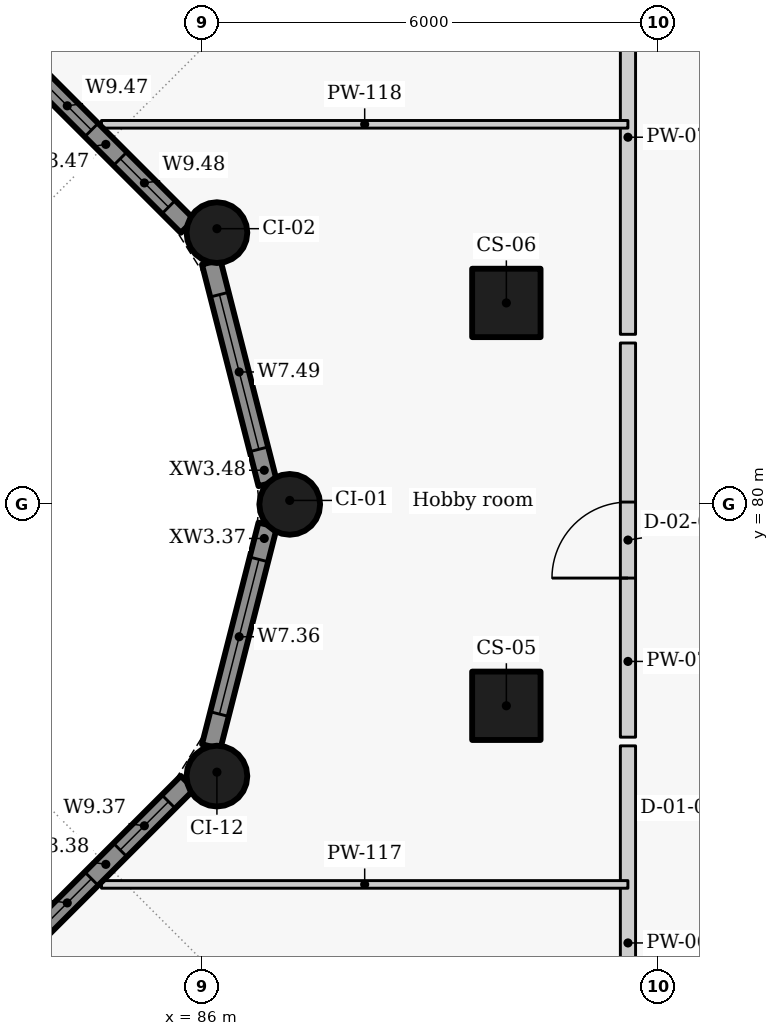
"""IFC4 building model, lengths in metres.
Left out: names, types, materials, properties, quantities, classifications, styles, units other than length and angle.
Written with IfcOpenShell. Run it as: python <this file> out.ifc"""

import sys

from ifc_helpers import new_model, si_unit, direction, frame, frame_2d, origin, origin_2d, place, context, subcontext, project, spatial, rectangle, circle, extrude, element, fill, save


model = new_model("IFC4")
c1 = context("Model", 3, precision=1e-05, world=origin(), true_north=direction((0.0, 1.0)))
c2 = subcontext(c1, "Body", "Model", "MODEL_VIEW")
j1 = project(units=[si_unit("LENGTHUNIT", "METRE"), si_unit("PLANEANGLEUNIT", "RADIAN")], contexts=[c1])
p1 = place(None, origin())
s1 = spatial("IfcSite", under=j1, at=p1, CompositionType="ELEMENT")
p2 = place(p1, origin())
s2 = spatial("IfcBuilding", under=s1, at=p2, CompositionType="ELEMENT")
p3 = place(p2, frame((0.0, 0.0, 183.3)))
s3 = spatial("IfcBuildingStorey", under=s2, at=p3, CompositionType="ELEMENT", Elevation=183.3)
for number, where, z_axis, x_axis in (
    (1, (90.0, 77.35, 0.0), (0.0, 0.0, 1.0), (0.0, 1.0, 0.0)),
    (2, (90.0, 82.65, 0.0), (0.0, 0.0, 1.0), (0.0, 1.0, 0.0)),
):
    element("IfcColumn", number, at=place(p3, frame(where, z_axis=z_axis, x_axis=x_axis)), inside=s3, PredefinedType="COLUMN", context=c2, shape_type="SweptSolid", body=[
        extrude(rectangle(XDim=0.9, YDim=0.9, at=origin_2d()), origin(), (0.0, 0.0, 1.0), 3.3),
    ])
for number, where, z_axis, x_axis in (
    (3, (87.15, 80.0, 0.0), (0.0, 0.0, 1.0), (0.0, 1.0, 0.0)),
    (4, (86.192, 83.575, 0.0), (0.0, 0.0, 1.0), (-0.5, 0.866, 0.0)),
    (5, (86.192, 76.425, 0.0), (0.0, 0.0, 1.0), (0.5, 0.866, 0.0)),
):
    element("IfcColumn", number, at=place(p3, frame(where, z_axis=z_axis, x_axis=x_axis)), inside=s3, PredefinedType="COLUMN", context=c2, shape_type="SweptSolid", body=[
        extrude(circle(Radius=0.4, at=origin_2d()), origin(), (0.0, 0.0, 1.0), 3.3),
    ])
p4 = place(p3, frame((86.86, 79.73, 0.0), z_axis=(0.0, 0.0, 1.0), x_axis=(-0.247055971283, -0.969001211069, 0.0)))
e6 = element("IfcWall", 6, at=p4, inside=s3, PredefinedType="SOLIDWALL", context=c2, shape_type="SweptSolid", body=[
    extrude(rectangle(XDim=3.01, YDim=0.25, at=frame_2d((1.505, 0.0))), origin(), (0.0, 0.0, 1.0), 2.425),
])
p5 = place(p4, frame((0.469, 0.0, 0.9)))
e7 = element("IfcOpeningElement", 7, at=p5, cuts=e6, PredefinedType="OPENING", context=c2, shape_type="SweptSolid", body=[
    extrude(rectangle(XDim=2.1, YDim=1.1, at=frame_2d((1.05, 0.55))), frame((0.0, 0.135, 0.0), z_axis=(0.0, -1.0, 0.0), x_axis=(1.0, 0.0, 0.0)), (0.0, 0.0, 1.0), 0.27),
])
p6 = place(p3, frame((85.806, 76.339, 0.0), z_axis=(0.0, 0.0, 1.0), x_axis=(-0.707106781187, -0.707106781187, 0.0)))
e8 = element("IfcWall", 8, at=p6, inside=s3, PredefinedType="SOLIDWALL", context=c2, shape_type="SweptSolid", body=[
    extrude(rectangle(XDim=3.033, YDim=0.25, at=frame_2d((1.517, 0.0))), origin(), (0.0, 0.0, 1.0), 2.425),
])
p7 = place(p6, frame((0.353, 0.0, 0.9)))
e9 = element("IfcOpeningElement", 9, at=p7, cuts=e8, PredefinedType="OPENING", context=c2, shape_type="SweptSolid", body=[
    extrude(rectangle(XDim=0.9, YDim=1.1, at=frame_2d((0.45, 0.55))), frame((0.0, 0.135, 0.0), z_axis=(0.0, -1.0, 0.0), x_axis=(1.0, 0.0, 0.0)), (0.0, 0.0, 1.0), 0.27),
])
p8 = place(p6, frame((1.788, 0.0, 0.9)))
e10 = element("IfcOpeningElement", 10, at=p8, cuts=e8, PredefinedType="OPENING", context=c2, shape_type="SweptSolid", body=[
    extrude(rectangle(XDim=0.9, YDim=1.1, at=frame_2d((0.45, 0.55))), frame((0.0, 0.135, 0.0), z_axis=(0.0, -1.0, 0.0), x_axis=(1.0, 0.0, 0.0)), (0.0, 0.0, 1.0), 0.27),
])
p9 = place(p3, frame((83.661, 85.806, 0.0), z_axis=(0.0, 0.0, 1.0), x_axis=(0.707106781187, -0.707106781187, 0.0)))
e11 = element("IfcWall", 11, at=p9, inside=s3, PredefinedType="SOLIDWALL", context=c2, shape_type="SweptSolid", body=[
    extrude(rectangle(XDim=3.033, YDim=0.25, at=frame_2d((1.517, 0.0))), origin(), (0.0, 0.0, 1.0), 2.425),
])
p10 = place(p9, frame((0.345, 0.0, 0.9)))
e12 = element("IfcOpeningElement", 12, at=p10, cuts=e11, PredefinedType="OPENING", context=c2, shape_type="SweptSolid", body=[
    extrude(rectangle(XDim=0.9, YDim=1.1, at=frame_2d((0.45, 0.55))), frame((0.0, 0.135, 0.0), z_axis=(0.0, -1.0, 0.0), x_axis=(1.0, 0.0, 0.0)), (0.0, 0.0, 1.0), 0.27),
])
p11 = place(p9, frame((1.78, 0.0, 0.9)))
e13 = element("IfcOpeningElement", 13, at=p11, cuts=e11, PredefinedType="OPENING", context=c2, shape_type="SweptSolid", body=[
    extrude(rectangle(XDim=0.9, YDim=1.1, at=frame_2d((0.45, 0.55))), frame((0.0, 0.135, 0.0), z_axis=(0.0, -1.0, 0.0), x_axis=(1.0, 0.0, 0.0)), (0.0, 0.0, 1.0), 0.27),
])
p12 = place(p3, frame((86.117, 83.187, 0.0), z_axis=(0.0, 0.0, 1.0), x_axis=(0.247055971283, -0.969001211069, 0.0)))
e14 = element("IfcWall", 14, at=p12, inside=s3, PredefinedType="SOLIDWALL", context=c2, shape_type="SweptSolid", body=[
    extrude(rectangle(XDim=3.01, YDim=0.25, at=frame_2d((1.505, 0.0))), origin(), (0.0, 0.0, 1.0), 2.425),
])
p13 = place(p12, frame((0.441, 0.0, 0.9)))
e15 = element("IfcOpeningElement", 15, at=p13, cuts=e14, PredefinedType="OPENING", context=c2, shape_type="SweptSolid", body=[
    extrude(rectangle(XDim=2.1, YDim=1.1, at=frame_2d((1.05, 0.55))), frame((0.0, 0.135, 0.0), z_axis=(0.0, -1.0, 0.0), x_axis=(1.0, 0.0, 0.0)), (0.0, 0.0, 1.0), 0.27),
])
p14 = place(p3, frame((91.6, 71.637, 0.0), z_axis=(0.0, 0.0, 1.0), x_axis=(0.0, 1.0, 0.0)))
e16 = element("IfcWall", 16, at=p14, inside=s3, PredefinedType="PARTITIONING", context=c2, shape_type="SweptSolid", body=[
    extrude(rectangle(XDim=5.186, YDim=0.2, at=frame_2d((2.593, 0.0))), origin(), (0.0, 0.0, 1.0), 3.025),
])
p15 = place(p3, frame((91.6, 76.937, 0.0), z_axis=(0.0, 0.0, 1.0), x_axis=(0.0, 1.0, 0.0)))
e17 = element("IfcWall", 17, at=p15, inside=s3, PredefinedType="PARTITIONING", context=c2, shape_type="SweptSolid", body=[
    extrude(rectangle(XDim=5.186, YDim=0.2, at=frame_2d((2.593, 0.0))), origin(), (0.0, 0.0, 1.0), 3.025),
])
p16 = place(p15, frame((2.093, 0.0, 0.0)))
e18 = element("IfcOpeningElement", 18, at=p16, cuts=e17, PredefinedType="OPENING", context=c2, shape_type="SweptSolid", body=[
    extrude(rectangle(XDim=1.0, YDim=2.1, at=frame_2d((0.5, 1.05))), frame((0.0, 0.11, 0.0), z_axis=(0.0, -1.0, 0.0), x_axis=(1.0, 0.0, 0.0)), (0.0, 0.0, 1.0), 0.22),
])
p17 = place(p3, frame((91.6, 82.237, 0.0), z_axis=(0.0, 0.0, 1.0), x_axis=(0.0, 1.0, 0.0)))
e19 = element("IfcWall", 19, at=p17, inside=s3, PredefinedType="PARTITIONING", context=c2, shape_type="SweptSolid", body=[
    extrude(rectangle(XDim=5.186, YDim=0.2, at=frame_2d((2.593, 0.0))), origin(), (0.0, 0.0, 1.0), 3.025),
])
for number, where, z_axis, x_axis in (
    (20, (84.673, 75.0, 0.0), (0.0, 0.0, 1.0), (1.0, 0.0, 0.0)),
    (21, (84.673, 85.0, 0.0), (0.0, 0.0, 1.0), (1.0, 0.0, 0.0)),
):
    element("IfcWall", number, at=place(p3, frame(where, z_axis=z_axis, x_axis=x_axis)), inside=s3, PredefinedType="PARTITIONING", context=c2, shape_type="SweptSolid", body=[
        extrude(rectangle(XDim=6.926, YDim=0.1, at=frame_2d((3.463, 0.0))), origin(), (0.0, 0.0, 1.0), 2.505),
    ])
p18 = place(p5, origin())
e22 = element("IfcWindow", 22, at=p18, inside=s3, PartitioningType="SINGLE_PANEL", PredefinedType="WINDOW", context=c2, shape_type="SweptSolid", body=[
    extrude(rectangle(XDim=2.1, YDim=1.1, at=frame_2d((1.05, 0.55))), frame((0.0, 0.03, 0.0), z_axis=(0.0, -1.0, 0.0), x_axis=(1.0, 0.0, 0.0)), (0.0, 0.0, 1.0), 0.06),
])
fill(e7, e22)
p19 = place(p7, origin())
e23 = element("IfcWindow", 23, at=p19, inside=s3, PartitioningType="SINGLE_PANEL", PredefinedType="WINDOW", context=c2, shape_type="SweptSolid", body=[
    extrude(rectangle(XDim=0.9, YDim=1.1, at=frame_2d((0.45, 0.55))), frame((0.0, 0.03, 0.0), z_axis=(0.0, -1.0, 0.0), x_axis=(1.0, 0.0, 0.0)), (0.0, 0.0, 1.0), 0.06),
])
fill(e9, e23)
p20 = place(p8, origin())
e24 = element("IfcWindow", 24, at=p20, inside=s3, PartitioningType="SINGLE_PANEL", PredefinedType="WINDOW", context=c2, shape_type="SweptSolid", body=[
    extrude(rectangle(XDim=0.9, YDim=1.1, at=frame_2d((0.45, 0.55))), frame((0.0, 0.03, 0.0), z_axis=(0.0, -1.0, 0.0), x_axis=(1.0, 0.0, 0.0)), (0.0, 0.0, 1.0), 0.06),
])
fill(e10, e24)
p21 = place(p10, origin())
e25 = element("IfcWindow", 25, at=p21, inside=s3, PartitioningType="SINGLE_PANEL", PredefinedType="WINDOW", context=c2, shape_type="SweptSolid", body=[
    extrude(rectangle(XDim=0.9, YDim=1.1, at=frame_2d((0.45, 0.55))), frame((0.0, 0.03, 0.0), z_axis=(0.0, -1.0, 0.0), x_axis=(1.0, 0.0, 0.0)), (0.0, 0.0, 1.0), 0.06),
])
fill(e12, e25)
p22 = place(p11, origin())
e26 = element("IfcWindow", 26, at=p22, inside=s3, PartitioningType="SINGLE_PANEL", PredefinedType="WINDOW", context=c2, shape_type="SweptSolid", body=[
    extrude(rectangle(XDim=0.9, YDim=1.1, at=frame_2d((0.45, 0.55))), frame((0.0, 0.03, 0.0), z_axis=(0.0, -1.0, 0.0), x_axis=(1.0, 0.0, 0.0)), (0.0, 0.0, 1.0), 0.06),
])
fill(e13, e26)
p23 = place(p13, origin())
e27 = element("IfcWindow", 27, at=p23, inside=s3, PartitioningType="SINGLE_PANEL", PredefinedType="WINDOW", context=c2, shape_type="SweptSolid", body=[
    extrude(rectangle(XDim=2.1, YDim=1.1, at=frame_2d((1.05, 0.55))), frame((0.0, 0.03, 0.0), z_axis=(0.0, -1.0, 0.0), x_axis=(1.0, 0.0, 0.0)), (0.0, 0.0, 1.0), 0.06),
])
fill(e15, e27)
p24 = place(p16, origin())
e28 = element("IfcDoor", 28, at=p24, inside=s3, OperationType="SINGLE_SWING_LEFT", PredefinedType="DOOR", context=c2, shape_type="SweptSolid", body=[
    extrude(rectangle(XDim=1.0, YDim=2.1, at=frame_2d((0.5, 1.05))), frame((0.0, 0.025, 0.0), z_axis=(0.0, -1.0, 0.0), x_axis=(1.0, 0.0, 0.0)), (0.0, 0.0, 1.0), 0.05),
])
fill(e18, e28)
save(model, sys.argv[1])
